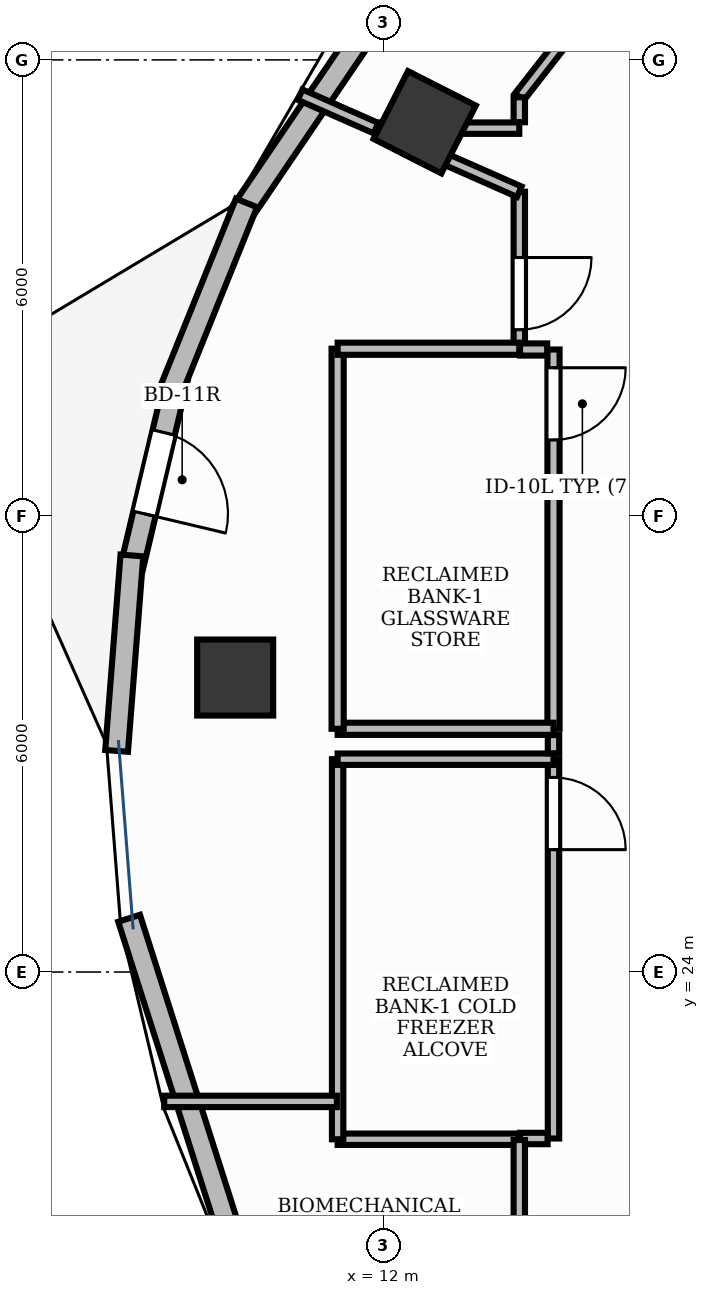
"""IFC4 building model, lengths in metres.
Left out: names, types, materials, properties, quantities, classifications, styles, units other than length and angle.
Written with IfcOpenShell. Run it as: python <this file> out.ifc"""

import sys

from ifc_helpers import new_model, si_unit, direction, frame, frame_2d, origin, origin_2d, place, context, subcontext, project, spatial, rectangle, extrude, element, fill, save


model = new_model("IFC4")
c1 = context("Model", 3, precision=1e-05, world=origin(), true_north=direction((0.0, 1.0)))
c2 = subcontext(c1, "Body", "Model", "MODEL_VIEW")
j1 = project(units=[si_unit("LENGTHUNIT", "METRE"), si_unit("PLANEANGLEUNIT", "RADIAN")], contexts=[c1])
p1 = place(None, origin())
s1 = spatial("IfcSite", under=j1, at=p1, CompositionType="ELEMENT")
p2 = place(p1, origin())
s2 = spatial("IfcBuilding", under=s1, at=p2, CompositionType="ELEMENT")
p3 = place(p2, frame((0.0, 0.0, 204.6)))
s3 = spatial("IfcBuildingStorey", under=s2, at=p3, CompositionType="ELEMENT", Elevation=204.6)
for number, where, z_axis, x_axis in (
    (1, (12.545, 35.18, -0.0), (0.0, 0.0, 1.0), (0.453, 0.891, 0.0)),
    (2, (10.052, 27.874, -0.0), (0.0, 0.0, 1.0), (0.0, 1.0, 0.0)),
):
    element("IfcColumn", number, at=place(p3, frame(where, z_axis=z_axis, x_axis=x_axis)), inside=s3, PredefinedType="COLUMN", context=c2, shape_type="SweptSolid", body=[
        extrude(rectangle(XDim=1.0, YDim=1.0, at=origin_2d()), origin(), (0.0, 0.0, 1.0), 3.901),
    ])
p4 = place(p3, frame((9.281, 31.81, 0.0), z_axis=(0.0, 0.0, 1.0), x_axis=(-0.230615918203, -0.973044859332, 0.0)))
e3 = element("IfcWall", 3, at=p4, inside=s3, PredefinedType="STANDARD", context=c2, shape_type="SweptSolid", body=[
    extrude(rectangle(XDim=2.563, YDim=0.3, at=frame_2d((1.281, 0.0))), origin(), (0.0, 0.0, 1.0), 3.9),
])
p5 = place(p4, frame((0.731, 0.0, 0.0)))
e4 = element("IfcOpeningElement", 4, at=p5, cuts=e3, PredefinedType="OPENING", context=c2, shape_type="SweptSolid", body=[
    extrude(rectangle(XDim=1.1, YDim=2.15, at=frame_2d((0.55, 1.075))), frame((0.0, 0.165, 0.0), z_axis=(0.0, -1.0, 0.0), x_axis=(1.0, 0.0, 0.0)), (0.0, 0.0, 1.0), 0.33),
])
p6 = place(p3, frame((13.103, 38.36, 0.0), z_axis=(0.0, 0.0, 1.0), x_axis=(-0.561387104339, -0.827553333074, 0.0)))
e5 = element("IfcWall", 5, at=p6, inside=s3, PredefinedType="STANDARD", context=c2, shape_type="SweptSolid", body=[
    extrude(rectangle(XDim=5.327, YDim=0.3, at=frame_2d((2.664, 0.0))), origin(), (0.0, 0.0, 1.0), 3.9),
])
p7 = place(p3, frame((10.201, 34.118, 0.0), z_axis=(0.0, 0.0, 1.0), x_axis=(-0.373821251241, -0.927500766642, 0.0)))
e6 = element("IfcWall", 6, at=p7, inside=s3, PredefinedType="STANDARD", context=c2, shape_type="SweptSolid", body=[
    extrude(rectangle(XDim=2.648, YDim=0.3, at=frame_2d((1.324, 0.0))), origin(), (0.0, 0.0, 1.0), 3.9),
])
p8 = place(p3, frame((8.693, 29.48, 0.0), z_axis=(0.0, 0.0, 1.0), x_axis=(-0.077999392987, -0.996953406481, 0.0)))
e7 = element("IfcWall", 7, at=p8, inside=s3, PredefinedType="STANDARD", context=c2, shape_type="SweptSolid", body=[
    extrude(rectangle(XDim=2.579, YDim=0.3, at=frame_2d((1.29, 0.0))), origin(), (0.0, 0.0, 1.0), 3.47),
])
p9 = place(p3, frame((8.656, 24.707, 0.0), z_axis=(0.0, 0.0, 1.0), x_axis=(0.30372166002, -0.952760805887, 0.0)))
e8 = element("IfcWall", 8, at=p9, inside=s3, PredefinedType="STANDARD", context=c2, shape_type="SweptSolid", body=[
    extrude(rectangle(XDim=5.077, YDim=0.3, at=frame_2d((2.539, 0.0))), origin(), (0.0, 0.0, 1.0), 3.47),
])
p10 = place(p3, frame((14.24, 26.8, 0.0), z_axis=(0.0, 0.0, 1.0), x_axis=(0.0, -1.0, 0.0)))
e9 = element("IfcWall", 9, at=p10, inside=s3, PredefinedType="PARTITIONING", context=c2, shape_type="SweptSolid", body=[
    extrude(rectangle(XDim=4.99, YDim=0.15, at=frame_2d((2.495, 0.0))), origin(), (0.0, 0.0, 1.0), 2.91),
])
p11 = place(p10, frame((0.24, 0.0, 0.0)))
e10 = element("IfcOpeningElement", 10, at=p11, cuts=e9, PredefinedType="OPENING", context=c2, shape_type="SweptSolid", body=[
    extrude(rectangle(XDim=0.95, YDim=2.15, at=frame_2d((0.475, 1.075))), frame((0.0, 0.09, 0.0), z_axis=(0.0, -1.0, 0.0), x_axis=(1.0, 0.0, 0.0)), (0.0, 0.0, 1.0), 0.18),
])
p12 = place(p3, frame((14.24, 32.19, 0.0), z_axis=(0.0, 0.0, 1.0), x_axis=(0.0, -1.0, 0.0)))
e11 = element("IfcWall", 11, at=p12, inside=s3, PredefinedType="PARTITIONING", context=c2, shape_type="SweptSolid", body=[
    extrude(rectangle(XDim=4.99, YDim=0.16, at=frame_2d((2.495, 0.0))), origin(), (0.0, 0.0, 1.0), 2.91),
])
p13 = place(p12, frame((0.24, 0.0, 0.0)))
e12 = element("IfcOpeningElement", 12, at=p13, cuts=e11, PredefinedType="OPENING", context=c2, shape_type="SweptSolid", body=[
    extrude(rectangle(XDim=0.95, YDim=2.15, at=frame_2d((0.475, 1.075))), frame((0.0, 0.095, 0.0), z_axis=(0.0, -1.0, 0.0), x_axis=(1.0, 0.0, 0.0)), (0.0, 0.0, 1.0), 0.19),
])
p14 = place(p3, frame((13.79, 34.266, 0.0), z_axis=(0.0, 0.0, 1.0), x_axis=(0.0, -1.0, 0.0)))
e13 = element("IfcWall", 13, at=p14, inside=s3, PredefinedType="PARTITIONING", context=c2, shape_type="SweptSolid", body=[
    extrude(rectangle(XDim=2.056, YDim=0.15, at=frame_2d((1.028, 0.0))), origin(), (0.0, 0.0, 1.0), 2.91),
])
p15 = place(p14, frame((0.865, 0.0, 0.0)))
e14 = element("IfcOpeningElement", 14, at=p15, cuts=e13, PredefinedType="OPENING", context=c2, shape_type="SweptSolid", body=[
    extrude(rectangle(XDim=0.95, YDim=2.15, at=frame_2d((0.475, 1.075))), frame((0.0, 0.09, 0.0), z_axis=(0.0, -1.0, 0.0), x_axis=(1.0, 0.0, 0.0)), (0.0, 0.0, 1.0), 0.18),
])
p16 = place(p3, frame((14.162, 21.81, 0.0), z_axis=(0.0, 0.0, 1.0), x_axis=(-1.0, 0.0, 0.0)))
e15 = element("IfcWall", 15, at=p16, inside=s3, PredefinedType="PARTITIONING", context=c2, shape_type="SweptSolid", body=[
    extrude(rectangle(XDim=0.362, YDim=0.15, at=frame_2d((0.181, 0.0))), origin(), (0.0, 0.0, 1.0), 2.91),
])
p17 = place(p3, frame((13.79, 21.8, 0.0), z_axis=(0.0, 0.0, 1.0), x_axis=(-1.0, 0.0, 0.0)))
e16 = element("IfcWall", 16, at=p17, inside=s3, PredefinedType="PARTITIONING", context=c2, shape_type="SweptSolid", body=[
    extrude(rectangle(XDim=2.39, YDim=0.15, at=frame_2d((1.195, 0.0))), origin(), (0.0, 0.0, 1.0), 2.91),
])
p18 = place(p3, frame((11.4, 21.8, 0.0), z_axis=(0.0, 0.0, 1.0), x_axis=(0.0, 1.0, 0.0)))
e17 = element("IfcWall", 17, at=p18, inside=s3, PredefinedType="PARTITIONING", context=c2, shape_type="SweptSolid", body=[
    extrude(rectangle(XDim=5.0, YDim=0.15, at=frame_2d((2.5, 0.0))), origin(), (0.0, 0.0, 1.0), 2.91),
])
p19 = place(p3, frame((11.4, 26.8, 0.0), z_axis=(0.0, 0.0, 1.0), x_axis=(1.0, 0.0, 0.0)))
e18 = element("IfcWall", 18, at=p19, inside=s3, PredefinedType="PARTITIONING", context=c2, shape_type="SweptSolid", body=[
    extrude(rectangle(XDim=2.84, YDim=0.15, at=frame_2d((1.42, 0.0))), origin(), (0.0, 0.0, 1.0), 2.91),
])
p20 = place(p3, frame((13.8, 32.19, 0.0), z_axis=(0.0, 0.0, 1.0), x_axis=(1.0, 0.0, 0.0)))
e19 = element("IfcWall", 19, at=p20, inside=s3, PredefinedType="PARTITIONING", context=c2, shape_type="SweptSolid", body=[
    extrude(rectangle(XDim=0.357, YDim=0.16, at=frame_2d((0.178, 0.0))), origin(), (0.0, 0.0, 1.0), 2.91),
])
p21 = place(p3, frame((14.24, 27.2, 0.0), z_axis=(0.0, 0.0, 1.0), x_axis=(-1.0, 0.0, 0.0)))
e20 = element("IfcWall", 20, at=p21, inside=s3, PredefinedType="PARTITIONING", context=c2, shape_type="SweptSolid", body=[
    extrude(rectangle(XDim=2.84, YDim=0.16, at=frame_2d((1.42, 0.0))), origin(), (0.0, 0.0, 1.0), 2.91),
])
p22 = place(p3, frame((11.4, 27.2, 0.0), z_axis=(0.0, 0.0, 1.0), x_axis=(0.0, 1.0, 0.0)))
e21 = element("IfcWall", 21, at=p22, inside=s3, PredefinedType="PARTITIONING", context=c2, shape_type="SweptSolid", body=[
    extrude(rectangle(XDim=5.0, YDim=0.16, at=frame_2d((2.5, 0.0))), origin(), (0.0, 0.0, 1.0), 2.91),
])
p23 = place(p3, frame((11.4, 32.2, 0.0), z_axis=(0.0, 0.0, 1.0), x_axis=(1.0, 0.0, 0.0)))
e22 = element("IfcWall", 22, at=p23, inside=s3, PredefinedType="PARTITIONING", context=c2, shape_type="SweptSolid", body=[
    extrude(rectangle(XDim=2.39, YDim=0.16, at=frame_2d((1.195, 0.0))), origin(), (0.0, 0.0, 1.0), 2.91),
])
p24 = place(p3, frame((9.119, 22.298, 0.0), z_axis=(0.0, 0.0, 1.0), x_axis=(1.0, 0.0, 0.0)))
e23 = element("IfcWall", 23, at=p24, inside=s3, PredefinedType="PARTITIONING", context=c2, shape_type="SweptSolid", body=[
    extrude(rectangle(XDim=2.271, YDim=0.15, at=frame_2d((1.136, 0.0))), origin(), (0.0, 0.0, 1.0), 2.91),
])
p25 = place(p3, frame((13.79, 21.79, 0.0), z_axis=(0.0, 0.0, 1.0), x_axis=(0.0, -1.0, 0.0)))
e24 = element("IfcWall", 24, at=p25, inside=s3, PredefinedType="PARTITIONING", context=c2, shape_type="SweptSolid", body=[
    extrude(rectangle(XDim=3.298, YDim=0.15, at=frame_2d((1.649, 0.0))), origin(), (0.0, 0.0, 1.0), 2.91),
])
p26 = place(p3, frame((14.76, 36.754, 0.0), z_axis=(0.0, 0.0, 1.0), x_axis=(-0.615625972761, -0.788038489962, 0.0)))
e25 = element("IfcWall", 25, at=p26, inside=s3, PredefinedType="PARTITIONING", context=c2, shape_type="SweptSolid", body=[
    extrude(rectangle(XDim=1.573, YDim=0.15, at=frame_2d((0.787, 0.0))), origin(), (0.0, 0.0, 1.0), 2.91),
])
p27 = place(p3, frame((13.79, 35.508, 0.0), z_axis=(0.0, 0.0, 1.0), x_axis=(0.0, -1.0, 0.0)))
e26 = element("IfcWall", 26, at=p27, inside=s3, PredefinedType="PARTITIONING", context=c2, shape_type="SweptSolid", body=[
    extrude(rectangle(XDim=0.328, YDim=0.15, at=frame_2d((0.164, 0.0))), origin(), (0.0, 0.0, 1.0), 2.91),
])
p28 = place(p3, frame((13.79, 35.102, 0.0), z_axis=(0.0, 0.0, 1.0), x_axis=(-1.0, 0.0, 0.0)))
e27 = element("IfcWall", 27, at=p28, inside=s3, PredefinedType="PARTITIONING", context=c2, shape_type="SweptSolid", body=[
    extrude(rectangle(XDim=1.885, YDim=0.15, at=frame_2d((0.943, 0.0))), origin(), (0.0, 0.0, 1.0), 2.91),
])
p29 = place(p3, frame((11.904, 35.102, 0.0), z_axis=(0.0, 0.0, 1.0), x_axis=(-0.914934829938, 0.403601606744, 0.0)))
e28 = element("IfcWall", 28, at=p29, inside=s3, PredefinedType="PARTITIONING", context=c2, shape_type="SweptSolid", body=[
    extrude(rectangle(XDim=1.09, YDim=0.15, at=frame_2d((0.545, 0.0))), origin(), (0.0, 0.0, 1.0), 2.91),
])
p30 = place(p3, frame((12.438, 34.862, 0.0), z_axis=(0.0, 0.0, 1.0), x_axis=(0.91487830716, -0.403729715389, 0.0)))
e29 = element("IfcWall", 29, at=p30, inside=s3, PredefinedType="PARTITIONING", context=c2, shape_type="SweptSolid", body=[
    extrude(rectangle(XDim=1.477, YDim=0.15, at=frame_2d((0.739, 0.0))), origin(), (0.0, 0.0, 1.0), 2.91),
])
p31 = place(p3, frame((14.24, 27.117, 0.0), z_axis=(0.0, 0.0, 1.0), x_axis=(0.0, -1.0, 0.0)))
e30 = element("IfcWall", 30, at=p31, inside=s3, PredefinedType="PARTITIONING", context=c2, shape_type="SweptSolid", body=[
    extrude(rectangle(XDim=0.239, YDim=0.15, at=frame_2d((0.12, 0.0))), origin(), (0.0, 0.0, 1.0), 2.91),
])
p32 = place(p5, origin())
e31 = element("IfcDoor", 31, at=p32, inside=s3, OperationType="SINGLE_SWING_RIGHT", PredefinedType="DOOR", context=c2, shape_type="SweptSolid", body=[
    extrude(rectangle(XDim=1.1, YDim=2.15, at=frame_2d((0.55, 1.075))), frame((0.0, 0.025, 0.0), z_axis=(0.0, -1.0, 0.0), x_axis=(1.0, 0.0, 0.0)), (0.0, 0.0, 1.0), 0.05),
])
fill(e4, e31)
p33 = place(p11, origin())
e32 = element("IfcDoor", 32, at=p33, inside=s3, OperationType="SINGLE_SWING_RIGHT", PredefinedType="DOOR", context=c2, shape_type="SweptSolid", body=[
    extrude(rectangle(XDim=0.95, YDim=2.15, at=frame_2d((0.475, 1.075))), frame((0.0, 0.025, 0.0), z_axis=(0.0, -1.0, 0.0), x_axis=(1.0, 0.0, 0.0)), (0.0, 0.0, 1.0), 0.05),
])
fill(e10, e32)
p34 = place(p13, origin())
e33 = element("IfcDoor", 33, at=p34, inside=s3, OperationType="SINGLE_SWING_LEFT", PredefinedType="DOOR", context=c2, shape_type="SweptSolid", body=[
    extrude(rectangle(XDim=0.95, YDim=2.15, at=frame_2d((0.475, 1.075))), frame((0.0, 0.025, 0.0), z_axis=(0.0, -1.0, 0.0), x_axis=(1.0, 0.0, 0.0)), (0.0, 0.0, 1.0), 0.05),
])
fill(e12, e33)
p35 = place(p15, origin())
e34 = element("IfcDoor", 34, at=p35, inside=s3, OperationType="SINGLE_SWING_LEFT", PredefinedType="DOOR", context=c2, shape_type="SweptSolid", body=[
    extrude(rectangle(XDim=0.95, YDim=2.15, at=frame_2d((0.475, 1.075))), frame((0.0, 0.025, 0.0), z_axis=(0.0, -1.0, 0.0), x_axis=(1.0, 0.0, 0.0)), (0.0, 0.0, 1.0), 0.05),
])
fill(e14, e34)
save(model, sys.argv[1])
